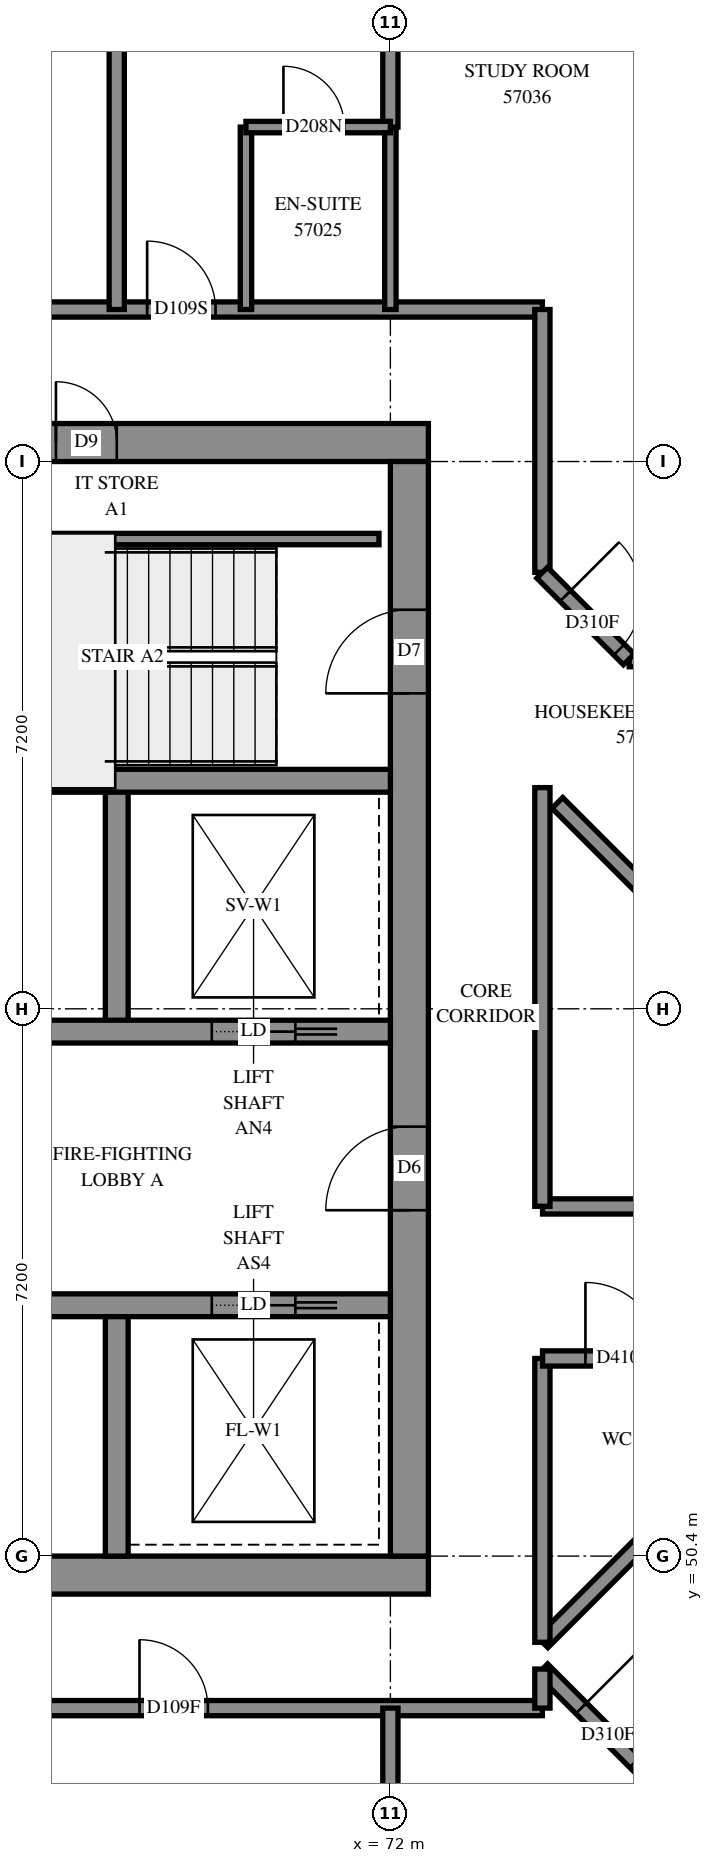
"""IFC4 building model, lengths in metres.
Left out: names, types, materials, properties, quantities, classifications, styles, units other than length and angle.
Written with IfcOpenShell. Run it as: python <this file> out.ifc"""

import sys

from ifc_helpers import new_model, si_unit, direction, frame, frame_2d, origin, place, context, subcontext, project, spatial, rectangle, extrude, element, fill, save


model = new_model("IFC4")
c1 = context("Model", 3, precision=1e-05, world=origin(), true_north=direction((0.0, 1.0)))
c2 = subcontext(c1, "Body", "Model", "MODEL_VIEW")
j1 = project(units=[si_unit("LENGTHUNIT", "METRE"), si_unit("PLANEANGLEUNIT", "RADIAN")], contexts=[c1])
p1 = place(None, origin())
s1 = spatial("IfcSite", under=j1, at=p1, CompositionType="ELEMENT")
p2 = place(p1, origin())
s2 = spatial("IfcBuilding", under=s1, at=p2, CompositionType="ELEMENT")
p3 = place(p2, frame((0.0, 0.0, 210.0)))
s3 = spatial("IfcBuildingStorey", under=s2, at=p3, CompositionType="ELEMENT", Elevation=210.0)
p4 = place(p3, frame((57.1, 50.15, -0.3), z_axis=(0.0, 0.0, 1.0), x_axis=(1.0, 0.0, 0.0)))
e1 = element("IfcWall", 1, at=p4, inside=s3, PredefinedType="SHEAR", context=c2, shape_type="SweptSolid", body=[
    extrude(rectangle(XDim=15.4, YDim=0.5, at=frame_2d((7.7, 0.0))), origin(), (0.0, 0.0, 1.0), 2.7),
])
p5 = place(p3, frame((57.1, 65.05, -0.3), z_axis=(0.0, 0.0, 1.0), x_axis=(1.0, 0.0, 0.0)))
e2 = element("IfcWall", 2, at=p5, inside=s3, PredefinedType="SHEAR", context=c2, shape_type="SweptSolid", body=[
    extrude(rectangle(XDim=15.4, YDim=0.5, at=frame_2d((7.7, 0.0))), origin(), (0.0, 0.0, 1.0), 2.7),
])
p6 = place(p5, frame((10.5, 0.0, 0.3)))
e3 = element("IfcOpeningElement", 3, at=p6, cuts=e2, PredefinedType="OPENING", context=c2, shape_type="SweptSolid", body=[
    extrude(rectangle(XDim=0.8, YDim=2.1, at=frame_2d((0.4, 1.05))), frame((0.0, 0.26, 0.0), z_axis=(0.0, -1.0, 0.0), x_axis=(1.0, 0.0, 0.0)), (0.0, 0.0, 1.0), 0.52),
])
p7 = place(p3, frame((72.25, 50.4, -0.3), z_axis=(0.0, 0.0, 1.0), x_axis=(0.0, 1.0, 0.0)))
e4 = element("IfcWall", 4, at=p7, inside=s3, PredefinedType="SHEAR", context=c2, shape_type="SweptSolid", body=[
    extrude(rectangle(XDim=14.4, YDim=0.5, at=frame_2d((7.2, 0.0))), origin(), (0.0, 0.0, 1.0), 2.7),
])
p8 = place(p7, frame((4.55, 0.0, 0.3)))
e5 = element("IfcOpeningElement", 5, at=p8, cuts=e4, PredefinedType="OPENING", context=c2, shape_type="SweptSolid", body=[
    extrude(rectangle(XDim=1.1, YDim=2.1, at=frame_2d((0.55, 1.05))), frame((0.0, 0.26, 0.0), z_axis=(0.0, -1.0, 0.0), x_axis=(1.0, 0.0, 0.0)), (0.0, 0.0, 1.0), 0.52),
])
p9 = place(p7, frame((11.35, 0.0, 0.3)))
e6 = element("IfcOpeningElement", 6, at=p9, cuts=e4, PredefinedType="OPENING", context=c2, shape_type="SweptSolid", body=[
    extrude(rectangle(XDim=1.1, YDim=2.1, at=frame_2d((0.55, 1.05))), frame((0.0, 0.26, 0.0), z_axis=(0.0, -1.0, 0.0), x_axis=(1.0, 0.0, 0.0)), (0.0, 0.0, 1.0), 0.52),
])
for number, where, z_axis, x_axis in (
    (7, (68.4, 50.4, 0.0), (0.0, 0.0, 1.0), (0.0, 1.0, 0.0)),
    (8, (68.4, 57.3, 0.0), (0.0, 0.0, 1.0), (0.0, 1.0, 0.0)),
):
    element("IfcWall", number, at=place(p3, frame(where, z_axis=z_axis, x_axis=x_axis)), inside=s3, PredefinedType="SOLIDWALL", context=c2, shape_type="SweptSolid", body=[
        extrude(rectangle(XDim=3.3, YDim=0.3, at=frame_2d((1.65, 0.0))), origin(), (0.0, 0.0, 1.0), 3.1),
    ])
p10 = place(p3, frame((57.6, 53.7, 0.0), z_axis=(0.0, 0.0, 1.0), x_axis=(1.0, 0.0, 0.0)))
e9 = element("IfcWall", 9, at=p10, inside=s3, PredefinedType="SOLIDWALL", context=c2, shape_type="SweptSolid", body=[
    extrude(rectangle(XDim=14.4, YDim=0.3, at=frame_2d((7.2, 0.0))), origin(), (0.0, 0.0, 1.0), 3.1),
])
p11 = place(p10, frame((1.35, 0.0, 0.0)))
e10 = element("IfcOpeningElement", 10, at=p11, cuts=e9, PredefinedType="OPENING", context=c2, shape_type="SweptSolid", body=[
    extrude(rectangle(XDim=0.9, YDim=2.1, at=frame_2d((0.45, 1.05))), frame((0.0, 0.16, 0.0), z_axis=(0.0, -1.0, 0.0), x_axis=(1.0, 0.0, 0.0)), (0.0, 0.0, 1.0), 0.32),
])
p12 = place(p10, frame((4.95, 0.0, 0.0)))
e11 = element("IfcOpeningElement", 11, at=p12, cuts=e9, PredefinedType="OPENING", context=c2, shape_type="SweptSolid", body=[
    extrude(rectangle(XDim=0.9, YDim=2.1, at=frame_2d((0.45, 1.05))), frame((0.0, 0.16, 0.0), z_axis=(0.0, -1.0, 0.0), x_axis=(1.0, 0.0, 0.0)), (0.0, 0.0, 1.0), 0.32),
])
p13 = place(p10, frame((8.55, 0.0, 0.0)))
e12 = element("IfcOpeningElement", 12, at=p13, cuts=e9, PredefinedType="OPENING", context=c2, shape_type="SweptSolid", body=[
    extrude(rectangle(XDim=0.9, YDim=2.1, at=frame_2d((0.45, 1.05))), frame((0.0, 0.16, 0.0), z_axis=(0.0, -1.0, 0.0), x_axis=(1.0, 0.0, 0.0)), (0.0, 0.0, 1.0), 0.32),
])
p14 = place(p10, frame((12.05, 0.0, 0.0)))
e13 = element("IfcOpeningElement", 13, at=p14, cuts=e9, PredefinedType="OPENING", context=c2, shape_type="SweptSolid", body=[
    extrude(rectangle(XDim=1.1, YDim=2.1, at=frame_2d((0.55, 1.05))), frame((0.0, 0.16, 0.0), z_axis=(0.0, -1.0, 0.0), x_axis=(1.0, 0.0, 0.0)), (0.0, 0.0, 1.0), 0.32),
])
p15 = place(p3, frame((57.6, 57.3, 0.0), z_axis=(0.0, 0.0, 1.0), x_axis=(1.0, 0.0, 0.0)))
e14 = element("IfcWall", 14, at=p15, inside=s3, PredefinedType="SOLIDWALL", context=c2, shape_type="SweptSolid", body=[
    extrude(rectangle(XDim=14.4, YDim=0.3, at=frame_2d((7.2, 0.0))), origin(), (0.0, 0.0, 1.0), 3.1),
])
p16 = place(p15, frame((1.25, 0.0, 0.0)))
e15 = element("IfcOpeningElement", 15, at=p16, cuts=e14, PredefinedType="OPENING", context=c2, shape_type="SweptSolid", body=[
    extrude(rectangle(XDim=1.1, YDim=2.1, at=frame_2d((0.55, 1.05))), frame((0.0, 0.16, 0.0), z_axis=(0.0, -1.0, 0.0), x_axis=(1.0, 0.0, 0.0)), (0.0, 0.0, 1.0), 0.32),
])
p17 = place(p15, frame((4.85, 0.0, 0.0)))
e16 = element("IfcOpeningElement", 16, at=p17, cuts=e14, PredefinedType="OPENING", context=c2, shape_type="SweptSolid", body=[
    extrude(rectangle(XDim=1.1, YDim=2.1, at=frame_2d((0.55, 1.05))), frame((0.0, 0.16, 0.0), z_axis=(0.0, -1.0, 0.0), x_axis=(1.0, 0.0, 0.0)), (0.0, 0.0, 1.0), 0.32),
])
p18 = place(p15, frame((8.45, 0.0, 0.0)))
e17 = element("IfcOpeningElement", 17, at=p18, cuts=e14, PredefinedType="OPENING", context=c2, shape_type="SweptSolid", body=[
    extrude(rectangle(XDim=1.1, YDim=2.1, at=frame_2d((0.55, 1.05))), frame((0.0, 0.16, 0.0), z_axis=(0.0, -1.0, 0.0), x_axis=(1.0, 0.0, 0.0)), (0.0, 0.0, 1.0), 0.32),
])
p19 = place(p15, frame((12.05, 0.0, 0.0)))
e18 = element("IfcOpeningElement", 18, at=p19, cuts=e14, PredefinedType="OPENING", context=c2, shape_type="SweptSolid", body=[
    extrude(rectangle(XDim=1.1, YDim=2.1, at=frame_2d((0.55, 1.05))), frame((0.0, 0.16, 0.0), z_axis=(0.0, -1.0, 0.0), x_axis=(1.0, 0.0, 0.0)), (0.0, 0.0, 1.0), 0.32),
])
p20 = place(p3, frame((64.8, 60.6, 0.0), z_axis=(0.0, 0.0, 1.0), x_axis=(1.0, 0.0, 0.0)))
e19 = element("IfcWall", 19, at=p20, inside=s3, PredefinedType="SOLIDWALL", context=c2, shape_type="SweptSolid", body=[
    extrude(rectangle(XDim=7.2, YDim=0.3, at=frame_2d((3.6, 0.0))), origin(), (0.0, 0.0, 1.0), 3.1),
])
p21 = place(p3, frame((64.95, 63.78, 0.0), z_axis=(0.0, 0.0, 1.0), x_axis=(1.0, 0.0, 0.0)))
e20 = element("IfcWall", 20, at=p21, inside=s3, PredefinedType="PARTITIONING", context=c2, shape_type="SweptSolid", body=[
    extrude(rectangle(XDim=6.9, YDim=0.15, at=frame_2d((3.45, 0.0))), origin(), (0.0, 0.0, 1.0), 3.1),
])
p22 = place(p3, frame((55.6, 48.4, 0.0), z_axis=(0.0, 0.0, 1.0), x_axis=(1.0, 0.0, 0.0)))
e21 = element("IfcWall", 21, at=p22, inside=s3, PredefinedType="PARTITIONING", context=c2, shape_type="SweptSolid", body=[
    extrude(rectangle(XDim=18.4, YDim=0.2, at=frame_2d((9.2, 0.0))), origin(), (0.0, 0.0, 1.0), 3.1),
])
p23 = place(p22, frame((5.862, 0.0, 0.0)))
e22 = element("IfcOpeningElement", 22, at=p23, cuts=e21, PredefinedType="OPENING", context=c2, shape_type="SweptSolid", body=[
    extrude(rectangle(XDim=1.0, YDim=2.1, at=frame_2d((0.5, 1.05))), frame((0.0, 0.11, 0.0), z_axis=(0.0, -1.0, 0.0), x_axis=(1.0, 0.0, 0.0)), (0.0, 0.0, 1.0), 0.22),
])
p24 = place(p22, frame((13.099, 0.0, 0.0)))
e23 = element("IfcOpeningElement", 23, at=p24, cuts=e21, PredefinedType="OPENING", context=c2, shape_type="SweptSolid", body=[
    extrude(rectangle(XDim=0.9, YDim=2.1, at=frame_2d((0.45, 1.05))), frame((0.0, 0.11, 0.0), z_axis=(0.0, -1.0, 0.0), x_axis=(1.0, 0.0, 0.0)), (0.0, 0.0, 1.0), 0.22),
])
p25 = place(p3, frame((55.6, 66.8, 0.0), z_axis=(0.0, 0.0, 1.0), x_axis=(1.0, 0.0, 0.0)))
e24 = element("IfcWall", 24, at=p25, inside=s3, PredefinedType="PARTITIONING", context=c2, shape_type="SweptSolid", body=[
    extrude(rectangle(XDim=18.4, YDim=0.2, at=frame_2d((9.2, 0.0))), origin(), (0.0, 0.0, 1.0), 3.1),
])
p26 = place(p25, frame((4.25, 0.0, 0.0)))
e25 = element("IfcOpeningElement", 25, at=p26, cuts=e24, PredefinedType="OPENING", context=c2, shape_type="SweptSolid", body=[
    extrude(rectangle(XDim=0.9, YDim=2.1, at=frame_2d((0.45, 1.05))), frame((0.0, 0.11, 0.0), z_axis=(0.0, -1.0, 0.0), x_axis=(1.0, 0.0, 0.0)), (0.0, 0.0, 1.0), 0.22),
])
p27 = place(p25, frame((7.974, 0.0, 0.0)))
e26 = element("IfcOpeningElement", 26, at=p27, cuts=e24, PredefinedType="OPENING", context=c2, shape_type="SweptSolid", body=[
    extrude(rectangle(XDim=1.0, YDim=2.1, at=frame_2d((0.5, 1.05))), frame((0.0, 0.11, 0.0), z_axis=(0.0, -1.0, 0.0), x_axis=(1.0, 0.0, 0.0)), (0.0, 0.0, 1.0), 0.22),
])
p28 = place(p25, frame((13.2, 0.0, 0.0)))
e27 = element("IfcOpeningElement", 27, at=p28, cuts=e24, PredefinedType="OPENING", context=c2, shape_type="SweptSolid", body=[
    extrude(rectangle(XDim=0.9, YDim=2.1, at=frame_2d((0.45, 1.05))), frame((0.0, 0.11, 0.0), z_axis=(0.0, -1.0, 0.0), x_axis=(1.0, 0.0, 0.0)), (0.0, 0.0, 1.0), 0.22),
])
p29 = place(p3, frame((68.4, 66.8, 0.0), z_axis=(0.0, 0.0, 1.0), x_axis=(0.0, 1.0, 0.0)))
e28 = element("IfcWall", 28, at=p29, inside=s3, PredefinedType="PARTITIONING", context=c2, shape_type="SweptSolid", body=[
    extrude(rectangle(XDim=5.928, YDim=0.2, at=frame_2d((2.964, 0.0))), origin(), (0.0, 0.0, 1.0), 3.1),
])
p30 = place(p3, frame((73.999, 48.911, 0.0), z_axis=(0.0, 0.0, 1.0), x_axis=(0.7071067812, -0.7071067812, 0.0)))
e29 = element("IfcWall", 29, at=p30, inside=s3, PredefinedType="PARTITIONING", context=c2, shape_type="SweptSolid", body=[
    extrude(rectangle(XDim=5.745, YDim=0.2, at=frame_2d((2.872, 0.0))), origin(), (0.0, 0.0, 1.0), 3.1),
])
p31 = place(p30, frame((0.724, 0.0, 0.0)))
e30 = element("IfcOpeningElement", 30, at=p31, cuts=e29, PredefinedType="OPENING", context=c2, shape_type="SweptSolid", body=[
    extrude(rectangle(XDim=1.0, YDim=2.1, at=frame_2d((0.5, 1.05))), frame((0.0, 0.11, 0.0), z_axis=(0.0, -1.0, 0.0), x_axis=(1.0, 0.0, 0.0)), (0.0, 0.0, 1.0), 0.22),
])
p32 = place(p3, frame((74.002, 55.0, 0.0), z_axis=(0.0, 0.0, 1.0), x_axis=(1.0, 0.0, 0.0)))
e31 = element("IfcWall", 31, at=p32, inside=s3, PredefinedType="PARTITIONING", context=c2, shape_type="SweptSolid", body=[
    extrude(rectangle(XDim=5.508, YDim=0.2, at=frame_2d((2.754, 0.0))), origin(), (0.0, 0.0, 1.0), 3.1),
])
p33 = place(p32, frame((1.51, 0.0, 0.0)))
e32 = element("IfcOpeningElement", 32, at=p33, cuts=e31, PredefinedType="OPENING", context=c2, shape_type="SweptSolid", body=[
    extrude(rectangle(XDim=1.0, YDim=2.1, at=frame_2d((0.5, 1.05))), frame((0.0, 0.11, 0.0), z_axis=(0.0, -1.0, 0.0), x_axis=(1.0, 0.0, 0.0)), (0.0, 0.0, 1.0), 0.22),
])
p34 = place(p3, frame((74.0, 55.002, 0.0), z_axis=(0.0, 0.0, 1.0), x_axis=(0.0, 1.0, 0.0)))
e33 = element("IfcWall", 33, at=p34, inside=s3, PredefinedType="PARTITIONING", context=c2, shape_type="SweptSolid", body=[
    extrude(rectangle(XDim=5.508, YDim=0.2, at=frame_2d((2.754, 0.0))), origin(), (0.0, 0.0, 1.0), 3.1),
])
p35 = place(p3, frame((74.001, 49.267, 0.0), z_axis=(0.0, 0.0, 1.0), x_axis=(0.7071067812, 0.7071067812, 0.0)))
e34 = element("IfcWall", 34, at=p35, inside=s3, PredefinedType="PARTITIONING", context=c2, shape_type="SweptSolid", body=[
    extrude(rectangle(XDim=5.278, YDim=0.2, at=frame_2d((2.639, 0.0))), origin(), (0.0, 0.0, 1.0), 3.1),
])
p36 = place(p3, frame((72.0, 43.6, 0.0), z_axis=(0.0, 0.0, 1.0), x_axis=(0.0, 1.0, 0.0)))
e35 = element("IfcWall", 35, at=p36, inside=s3, PredefinedType="PARTITIONING", context=c2, shape_type="SweptSolid", body=[
    extrude(rectangle(XDim=4.8, YDim=0.2, at=frame_2d((2.4, 0.0))), origin(), (0.0, 0.0, 1.0), 3.1),
])
p37 = place(p3, frame((74.197, 60.309, 0.0), z_axis=(0.0, 0.0, 1.0), x_axis=(0.7071067812, -0.7071067812, 0.0)))
e36 = element("IfcWall", 36, at=p37, inside=s3, PredefinedType="PARTITIONING", context=c2, shape_type="SweptSolid", body=[
    extrude(rectangle(XDim=4.738, YDim=0.2, at=frame_2d((2.369, 0.0))), origin(), (0.0, 0.0, 1.0), 3.1),
])
p38 = place(p3, frame((75.142, 62.2, 0.0), z_axis=(0.0, 0.0, 1.0), x_axis=(1.0, 0.0, 0.0)))
e37 = element("IfcWall", 37, at=p38, inside=s3, PredefinedType="PARTITIONING", context=c2, shape_type="SweptSolid", body=[
    extrude(rectangle(XDim=4.058, YDim=0.2, at=frame_2d((2.029, 0.0))), origin(), (0.0, 0.0, 1.0), 3.1),
])
p39 = place(p38, frame((2.808, 0.0, 0.0)))
e38 = element("IfcOpeningElement", 38, at=p39, cuts=e37, PredefinedType="OPENING", context=c2, shape_type="SweptSolid", body=[
    extrude(rectangle(XDim=0.9, YDim=2.1, at=frame_2d((0.45, 1.05))), frame((0.0, 0.11, 0.0), z_axis=(0.0, -1.0, 0.0), x_axis=(1.0, 0.0, 0.0)), (0.0, 0.0, 1.0), 0.22),
])
p40 = place(p3, frame((74.0, 49.266, 0.0), z_axis=(0.0, 0.0, 1.0), x_axis=(0.0, 1.0, 0.0)))
e39 = element("IfcWall", 39, at=p40, inside=s3, PredefinedType="PARTITIONING", context=c2, shape_type="SweptSolid", body=[
    extrude(rectangle(XDim=3.734, YDim=0.2, at=frame_2d((1.867, 0.0))), origin(), (0.0, 0.0, 1.0), 3.1),
])
p41 = place(p3, frame((74.002, 53.0, 0.0), z_axis=(0.0, 0.0, 1.0), x_axis=(1.0, 0.0, 0.0)))
e40 = element("IfcWall", 40, at=p41, inside=s3, PredefinedType="PARTITIONING", context=c2, shape_type="SweptSolid", body=[
    extrude(rectangle(XDim=3.732, YDim=0.2, at=frame_2d((1.866, 0.0))), origin(), (0.0, 0.0, 1.0), 3.1),
])
p42 = place(p41, frame((0.564, 0.0, 0.0)))
e41 = element("IfcOpeningElement", 41, at=p42, cuts=e40, PredefinedType="OPENING", context=c2, shape_type="SweptSolid", body=[
    extrude(rectangle(XDim=1.0, YDim=2.1, at=frame_2d((0.5, 1.05))), frame((0.0, 0.11, 0.0), z_axis=(0.0, -1.0, 0.0), x_axis=(1.0, 0.0, 0.0)), (0.0, 0.0, 1.0), 0.22),
])
p43 = place(p3, frame((74.0, 63.342, 0.0), z_axis=(0.0, 0.0, 1.0), x_axis=(0.0, 1.0, 0.0)))
e42 = element("IfcWall", 42, at=p43, inside=s3, PredefinedType="PARTITIONING", context=c2, shape_type="SweptSolid", body=[
    extrude(rectangle(XDim=3.458, YDim=0.2, at=frame_2d((1.729, 0.0))), origin(), (0.0, 0.0, 1.0), 3.1),
])
for number, where, z_axis, x_axis in (
    (43, (70.1, 66.8, 0.0), (0.0, 0.0, 1.0), (0.0, 1.0, 0.0)),
    (44, (72.0, 66.8, 0.0), (0.0, 0.0, 1.0), (0.0, 1.0, 0.0)),
):
    element("IfcWall", number, at=place(p3, frame(where, z_axis=z_axis, x_axis=x_axis)), inside=s3, PredefinedType="PARTITIONING", context=c2, shape_type="SweptSolid", body=[
        extrude(rectangle(XDim=2.4, YDim=0.15, at=frame_2d((1.2, 0.0))), origin(), (0.0, 0.0, 1.0), 3.1),
    ])
p44 = place(p3, frame((72.0, 69.2, 0.0), z_axis=(0.0, 0.0, 1.0), x_axis=(0.0, 1.0, 0.0)))
e45 = element("IfcWall", 45, at=p44, inside=s3, PredefinedType="PARTITIONING", context=c2, shape_type="SweptSolid", body=[
    extrude(rectangle(XDim=2.4, YDim=0.2, at=frame_2d((1.2, 0.0))), origin(), (0.0, 0.0, 1.0), 3.1),
])
p45 = place(p3, frame((70.1, 69.2, 0.0), z_axis=(0.0, 0.0, 1.0), x_axis=(1.0, 0.0, 0.0)))
e46 = element("IfcWall", 46, at=p45, inside=s3, PredefinedType="PARTITIONING", context=c2, shape_type="SweptSolid", body=[
    extrude(rectangle(XDim=1.9, YDim=0.15, at=frame_2d((0.95, 0.0))), origin(), (0.0, 0.0, 1.0), 3.1),
])
p46 = place(p45, frame((0.493, 0.0, 0.0)))
e47 = element("IfcOpeningElement", 47, at=p46, cuts=e46, PredefinedType="OPENING", context=c2, shape_type="SweptSolid", body=[
    extrude(rectangle(XDim=0.8, YDim=2.1, at=frame_2d((0.4, 1.05))), frame((0.0, 0.085, 0.0), z_axis=(0.0, -1.0, 0.0), x_axis=(1.0, 0.0, 0.0)), (0.0, 0.0, 1.0), 0.17),
])
p47 = place(p3, frame((73.997, 63.337, 0.0), z_axis=(0.0, 0.0, 1.0), x_axis=(0.7071067812, -0.7071067812, 0.0)))
e48 = element("IfcWall", 48, at=p47, inside=s3, PredefinedType="PARTITIONING", context=c2, shape_type="SweptSolid", body=[
    extrude(rectangle(XDim=1.612, YDim=0.2, at=frame_2d((0.806, 0.0))), origin(), (0.0, 0.0, 1.0), 3.1),
])
p48 = place(p47, frame((0.432, 0.0, 0.0)))
e49 = element("IfcOpeningElement", 49, at=p48, cuts=e48, PredefinedType="OPENING", context=c2, shape_type="SweptSolid", body=[
    extrude(rectangle(XDim=1.0, YDim=2.1, at=frame_2d((0.5, 1.05))), frame((0.0, 0.11, 0.0), z_axis=(0.0, -1.0, 0.0), x_axis=(1.0, 0.0, 0.0)), (0.0, 0.0, 1.0), 0.22),
])
p49 = place(p3, frame((74.0, 48.4, 0.0), z_axis=(0.0, 0.0, 1.0), x_axis=(0.0, 1.0, 0.0)))
e50 = element("IfcWall", 50, at=p49, inside=s3, PredefinedType="PARTITIONING", context=c2, shape_type="SweptSolid", body=[
    extrude(rectangle(XDim=0.514, YDim=0.2, at=frame_2d((0.257, 0.0))), origin(), (0.0, 0.0, 1.0), 3.1),
])
p50 = place(p6, origin())
e51 = element("IfcDoor", 51, at=p50, inside=s3, OperationType="SINGLE_SWING_RIGHT", PredefinedType="DOOR", context=c2, shape_type="SweptSolid", body=[
    extrude(rectangle(XDim=0.8, YDim=2.1, at=frame_2d((0.4, 1.05))), frame((0.0, 0.025, 0.0), z_axis=(0.0, -1.0, 0.0), x_axis=(1.0, 0.0, 0.0)), (0.0, 0.0, 1.0), 0.05),
])
fill(e3, e51)
p51 = place(p8, origin())
e52 = element("IfcDoor", 52, at=p51, inside=s3, OperationType="DOUBLE_DOOR_SINGLE_SWING", PredefinedType="DOOR", context=c2, shape_type="SweptSolid", body=[
    extrude(rectangle(XDim=1.1, YDim=2.1, at=frame_2d((0.55, 1.05))), frame((0.0, 0.025, 0.0), z_axis=(0.0, -1.0, 0.0), x_axis=(1.0, 0.0, 0.0)), (0.0, 0.0, 1.0), 0.05),
])
fill(e5, e52)
p52 = place(p9, origin())
e53 = element("IfcDoor", 53, at=p52, inside=s3, OperationType="SINGLE_SWING_RIGHT", PredefinedType="DOOR", context=c2, shape_type="SweptSolid", body=[
    extrude(rectangle(XDim=1.1, YDim=2.1, at=frame_2d((0.55, 1.05))), frame((0.0, 0.025, 0.0), z_axis=(0.0, -1.0, 0.0), x_axis=(1.0, 0.0, 0.0)), (0.0, 0.0, 1.0), 0.05),
])
fill(e6, e53)
p53 = place(p14, origin())
e54 = element("IfcDoor", 54, at=p53, inside=s3, OperationType="SLIDING_TO_RIGHT", PredefinedType="DOOR", context=c2, shape_type="SweptSolid", body=[
    extrude(rectangle(XDim=1.1, YDim=2.1, at=frame_2d((0.55, 1.05))), frame((0.0, 0.025, 0.0), z_axis=(0.0, -1.0, 0.0), x_axis=(1.0, 0.0, 0.0)), (0.0, 0.0, 1.0), 0.05),
])
fill(e13, e54)
p54 = place(p19, origin())
e55 = element("IfcDoor", 55, at=p54, inside=s3, OperationType="SLIDING_TO_RIGHT", PredefinedType="DOOR", context=c2, shape_type="SweptSolid", body=[
    extrude(rectangle(XDim=1.1, YDim=2.1, at=frame_2d((0.55, 1.05))), frame((0.0, 0.025, 0.0), z_axis=(0.0, -1.0, 0.0), x_axis=(1.0, 0.0, 0.0)), (0.0, 0.0, 1.0), 0.05),
])
fill(e18, e55)
p55 = place(p42, origin())
e56 = element("IfcDoor", 56, at=p55, inside=s3, OperationType="SINGLE_SWING_RIGHT", PredefinedType="DOOR", context=c2, shape_type="SweptSolid", body=[
    extrude(rectangle(XDim=1.0, YDim=2.1, at=frame_2d((0.5, 1.05))), frame((0.0, 0.025, 0.0), z_axis=(0.0, -1.0, 0.0), x_axis=(1.0, 0.0, 0.0)), (0.0, 0.0, 1.0), 0.05),
])
fill(e41, e56)
p56 = place(p28, origin())
e57 = element("IfcDoor", 57, at=p56, inside=s3, OperationType="SINGLE_SWING_LEFT", PredefinedType="DOOR", context=c2, shape_type="SweptSolid", body=[
    extrude(rectangle(XDim=0.9, YDim=2.1, at=frame_2d((0.45, 1.05))), frame((0.0, 0.025, 0.0), z_axis=(0.0, -1.0, 0.0), x_axis=(1.0, 0.0, 0.0)), (0.0, 0.0, 1.0), 0.05),
])
fill(e27, e57)
p57 = place(p46, origin())
e58 = element("IfcDoor", 58, at=p57, inside=s3, OperationType="SINGLE_SWING_RIGHT", PredefinedType="DOOR", context=c2, shape_type="SweptSolid", body=[
    extrude(rectangle(XDim=0.8, YDim=2.1, at=frame_2d((0.4, 1.05))), frame((0.0, 0.025, 0.0), z_axis=(0.0, -1.0, 0.0), x_axis=(1.0, 0.0, 0.0)), (0.0, 0.0, 1.0), 0.05),
])
fill(e47, e58)
p58 = place(p48, origin())
e59 = element("IfcDoor", 59, at=p58, inside=s3, OperationType="SINGLE_SWING_RIGHT", PredefinedType="DOOR", context=c2, shape_type="SweptSolid", body=[
    extrude(rectangle(XDim=1.0, YDim=2.1, at=frame_2d((0.5, 1.05))), frame((0.0, 0.025, 0.0), z_axis=(0.0, -1.0, 0.0), x_axis=(1.0, 0.0, 0.0)), (0.0, 0.0, 1.0), 0.05),
])
fill(e49, e59)
p59 = place(p24, origin())
e60 = element("IfcDoor", 60, at=p59, inside=s3, OperationType="SINGLE_SWING_LEFT", PredefinedType="DOOR", context=c2, shape_type="SweptSolid", body=[
    extrude(rectangle(XDim=0.9, YDim=2.1, at=frame_2d((0.45, 1.05))), frame((0.0, 0.025, 0.0), z_axis=(0.0, -1.0, 0.0), x_axis=(1.0, 0.0, 0.0)), (0.0, 0.0, 1.0), 0.05),
])
fill(e23, e60)
p60 = place(p31, origin())
e61 = element("IfcDoor", 61, at=p60, inside=s3, OperationType="SINGLE_SWING_LEFT", PredefinedType="DOOR", context=c2, shape_type="SweptSolid", body=[
    extrude(rectangle(XDim=1.0, YDim=2.1, at=frame_2d((0.5, 1.05))), frame((0.0, 0.025, 0.0), z_axis=(0.0, -1.0, 0.0), x_axis=(1.0, 0.0, 0.0)), (0.0, 0.0, 1.0), 0.05),
])
fill(e30, e61)
save(model, sys.argv[1])
